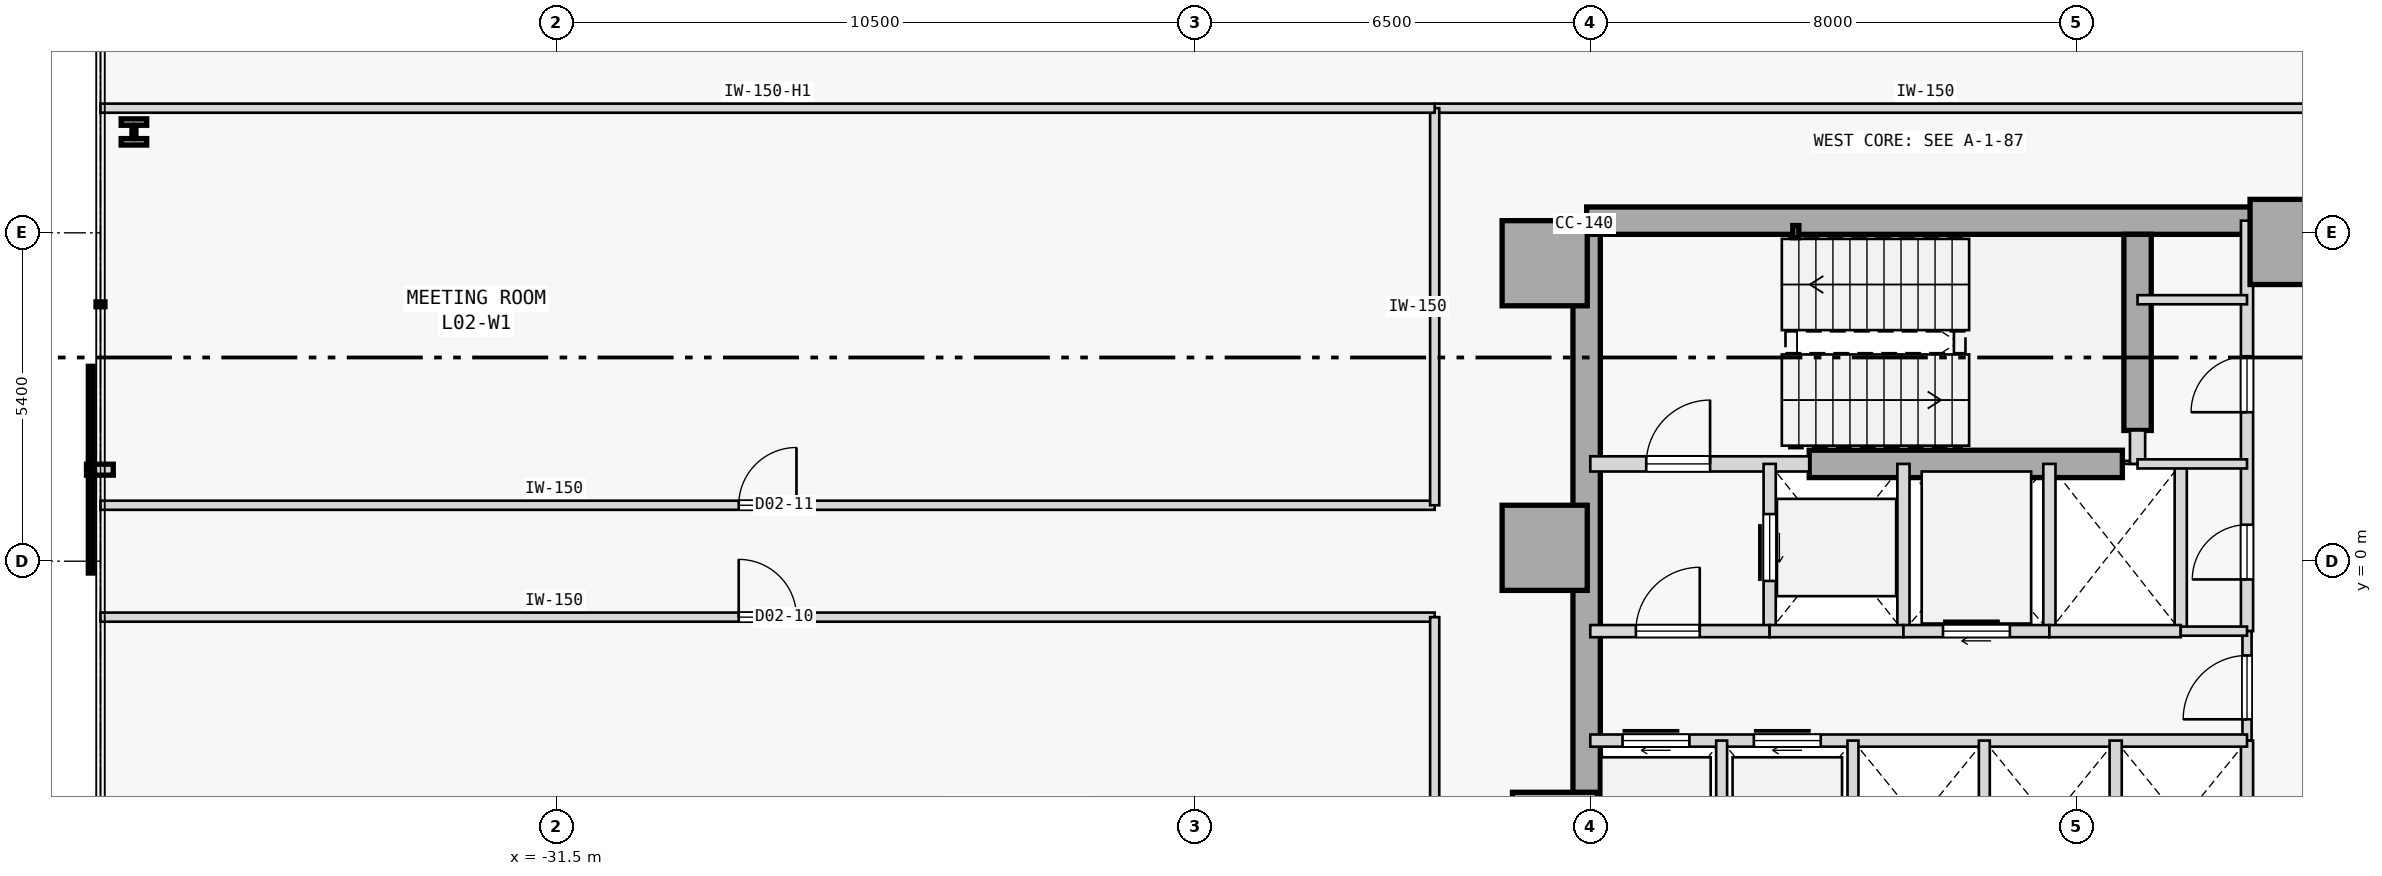
"""IFC4 building model, lengths in metres.
Left out: names, types, materials, properties, quantities, classifications, styles, units other than length and angle.
Written with IfcOpenShell. Run it as: python <this file> out.ifc"""

import sys

from ifc_helpers import new_model, si_unit, direction, frame, frame_2d, origin, origin_2d, place, context, subcontext, project, spatial, rectangle, hollow_rectangle, i_section, extrude, element, fill, save


model = new_model("IFC4")
c1 = context("Model", 3, precision=1e-05, world=origin(), true_north=direction((0.0, 1.0)))
c2 = subcontext(c1, "Body", "Model", "MODEL_VIEW")
j1 = project(units=[si_unit("LENGTHUNIT", "METRE"), si_unit("PLANEANGLEUNIT", "RADIAN")], contexts=[c1])
p1 = place(None, origin())
s1 = spatial("IfcSite", under=j1, at=p1, CompositionType="ELEMENT")
p2 = place(p1, origin())
s2 = spatial("IfcBuilding", under=s1, at=p2, CompositionType="ELEMENT")
p3 = place(p2, frame((0.0, 0.0, 14.2)))
s3 = spatial("IfcBuildingStorey", under=s2, at=p3, CompositionType="ELEMENT", Elevation=14.2)
for number, where, z_axis, x_axis in (
    (1, (-15.25, 4.9, 0.0), (0.0, 0.0, 1.0), (1.0, 0.0, 0.0)),
    (2, (-15.25, 0.22, 0.0), (0.0, 0.0, 1.0), (1.0, 0.0, 0.0)),
    (3, (-15.08, -4.5, 0.0), (0.0, 0.0, 1.0), (1.0, 0.0, 0.0)),
    (4, (-2.95, 5.25, 0.0), (0.0, 0.0, 1.0), (1.0, 0.0, 0.0)),
):
    element("IfcColumn", number, at=place(p3, frame(where, z_axis=z_axis, x_axis=x_axis)), inside=s3, PredefinedType="COLUMN", context=c2, shape_type="SweptSolid", body=[
        extrude(rectangle(XDim=1.4, YDim=1.4, at=origin_2d()), origin(), (0.0, 0.0, 1.0), 3.8),
    ])
p4 = place(p3, frame((-14.56, 5.6, 0.0), z_axis=(0.0, 0.0, 1.0), x_axis=(1.0, 0.0, 0.0)))
e5 = element("IfcWall", 5, at=p4, inside=s3, PredefinedType="SHEAR", context=c2, shape_type="SweptSolid", body=[
    extrude(rectangle(XDim=11.41, YDim=0.45, at=frame_2d((5.705, 0.0))), origin(), (0.0, 0.0, 1.0), 3.575),
])
p5 = place(p3, frame((-14.56, -5.375, 0.0), z_axis=(0.0, 0.0, 1.0), x_axis=(0.0, 1.0, 0.0)))
e6 = element("IfcWall", 6, at=p5, inside=s3, PredefinedType="SHEAR", context=c2, shape_type="SweptSolid", body=[
    extrude(rectangle(XDim=10.75, YDim=0.45, at=frame_2d((5.375, 0.0))), origin(), (0.0, 0.0, 1.0), 3.575),
])
p6 = place(p3, frame((-5.5, 2.15, 0.0), z_axis=(0.0, 0.0, 1.0), x_axis=(0.0, 1.0, 0.0)))
e7 = element("IfcWall", 7, at=p6, inside=s3, PredefinedType="SHEAR", context=c2, shape_type="SweptSolid", body=[
    extrude(rectangle(XDim=3.225, YDim=0.45, at=frame_2d((1.613, 0.0))), origin(), (0.0, 0.0, 1.0), 3.575),
])
p7 = place(p3, frame((-10.9, 1.6, 0.0), z_axis=(0.0, 0.0, 1.0), x_axis=(1.0, 0.0, 0.0)))
e8 = element("IfcWall", 8, at=p7, inside=s3, PredefinedType="SHEAR", context=c2, shape_type="SweptSolid", body=[
    extrude(rectangle(XDim=5.15, YDim=0.45, at=frame_2d((2.575, 0.0))), origin(), (0.0, 0.0, 1.0), 3.575),
])
p8 = place(p3, frame((-11.12, 5.42, 0.0), z_axis=(0.0, 0.0, 1.0), x_axis=(1.0, 0.0, 0.0)))
e9 = element("IfcColumn", 9, at=p8, inside=s3, PredefinedType="COLUMN", context=c2, shape_type="SweptSolid", body=[
    extrude(hollow_rectangle(XDim=0.1, YDim=0.2, WallThickness=0.008, at=origin_2d()), origin(), (0.0, 0.0, 1.0), 3.8),
])
p9 = place(p3, frame((-38.45, 7.059, 0.0), z_axis=(0.0, 0.0, 1.0), x_axis=(1.0, 0.0, 0.0)))
e10 = element("IfcColumn", 10, at=p9, inside=s3, PredefinedType="COLUMN", context=c2, shape_type="SweptSolid", body=[
    extrude(i_section(OverallWidth=0.42, OverallDepth=0.431, WebThickness=0.065, FlangeThickness=0.106, FilletRadius=0.015, at=origin_2d()), origin(), (0.0, 0.0, 1.0), 3.8),
])
p10 = place(p3, frame((-14.5, 1.6, 0.0), z_axis=(0.0, 0.0, 1.0), x_axis=(1.0, 0.0, 0.0)))
e11 = element("IfcWall", 11, at=p10, inside=s3, PredefinedType="STANDARD", context=c2, shape_type="SweptSolid", body=[
    extrude(rectangle(XDim=3.6, YDim=0.25, at=frame_2d((1.8, 0.0))), origin(), (0.0, 0.0, 1.0), 3.575),
])
p11 = place(p10, frame((0.92, 0.0, 0.0)))
e12 = element("IfcOpeningElement", 12, at=p11, cuts=e11, PredefinedType="OPENING", context=c2, shape_type="SweptSolid", body=[
    extrude(rectangle(XDim=1.05, YDim=2.15, at=frame_2d((0.525, 1.075))), frame((0.0, 0.135, 0.0), z_axis=(0.0, -1.0, 0.0), x_axis=(1.0, 0.0, 0.0)), (0.0, 0.0, 1.0), 0.27),
])
p12 = place(p3, frame((-5.5, 1.6, 0.0), z_axis=(0.0, 0.0, 1.0), x_axis=(0.0, 1.0, 0.0)))
e13 = element("IfcWall", 13, at=p12, inside=s3, PredefinedType="STANDARD", context=c2, shape_type="SweptSolid", body=[
    extrude(rectangle(XDim=0.55, YDim=0.25, at=frame_2d((0.275, 0.0))), origin(), (0.0, 0.0, 1.0), 3.575),
])
p13 = place(p3, frame((-3.7, -1.15, 0.0), z_axis=(0.0, 0.0, 1.0), x_axis=(0.0, 1.0, 0.0)))
e14 = element("IfcWall", 14, at=p13, inside=s3, PredefinedType="STANDARD", context=c2, shape_type="SweptSolid", body=[
    extrude(rectangle(XDim=6.75, YDim=0.2, at=frame_2d((3.375, 0.0))), origin(), (0.0, 0.0, 1.0), 3.575),
])
p14 = place(p13, frame((3.6, 0.0, 0.0)))
e15 = element("IfcOpeningElement", 15, at=p14, cuts=e14, PredefinedType="OPENING", context=c2, shape_type="SweptSolid", body=[
    extrude(rectangle(XDim=0.92, YDim=2.15, at=frame_2d((0.46, 1.075))), frame((0.0, 0.11, 0.0), z_axis=(0.0, -1.0, 0.0), x_axis=(1.0, 0.0, 0.0)), (0.0, 0.0, 1.0), 0.22),
])
p15 = place(p13, frame((0.85, 0.0, 0.0)))
e16 = element("IfcOpeningElement", 16, at=p15, cuts=e14, PredefinedType="OPENING", context=c2, shape_type="SweptSolid", body=[
    extrude(rectangle(XDim=0.9, YDim=2.15, at=frame_2d((0.45, 1.075))), frame((0.0, 0.11, 0.0), z_axis=(0.0, -1.0, 0.0), x_axis=(1.0, 0.0, 0.0)), (0.0, 0.0, 1.0), 0.22),
])
p16 = place(p3, frame((-3.7, -2.95, 0.0), z_axis=(0.0, 0.0, 1.0), x_axis=(0.0, 1.0, 0.0)))
e17 = element("IfcWall", 17, at=p16, inside=s3, PredefinedType="PARTITIONING", context=c2, shape_type="SweptSolid", body=[
    extrude(rectangle(XDim=1.8, YDim=0.15, at=frame_2d((0.9, 0.0))), origin(), (0.0, 0.0, 1.0), 3.575),
])
p17 = place(p16, frame((0.35, 0.0, 0.0)))
e18 = element("IfcOpeningElement", 18, at=p17, cuts=e17, PredefinedType="OPENING", context=c2, shape_type="SweptSolid", body=[
    extrude(rectangle(XDim=1.05, YDim=2.18, at=frame_2d((0.525, 1.09))), frame((0.0, 0.085, 0.0), z_axis=(0.0, -1.0, 0.0), x_axis=(1.0, 0.0, 0.0)), (0.0, 0.0, 1.0), 0.17),
])
p18 = place(p3, frame((-3.7, -5.6, 0.0), z_axis=(0.0, 0.0, 1.0), x_axis=(0.0, 1.0, 0.0)))
e19 = element("IfcWall", 19, at=p18, inside=s3, PredefinedType="STANDARD", context=c2, shape_type="SweptSolid", body=[
    extrude(rectangle(XDim=2.65, YDim=0.2, at=frame_2d((1.325, 0.0))), origin(), (0.0, 0.0, 1.0), 3.575),
])
p19 = place(p3, frame((-11.55, -1.15, 0.0), z_axis=(0.0, 0.0, 1.0), x_axis=(0.0, 1.0, 0.0)))
e20 = element("IfcWall", 20, at=p19, inside=s3, PredefinedType="STANDARD", context=c2, shape_type="SweptSolid", body=[
    extrude(rectangle(XDim=2.75, YDim=0.2, at=frame_2d((1.375, 0.0))), origin(), (0.0, 0.0, 1.0), 3.575),
])
p20 = place(p19, frame((0.825, 0.0, 0.0)))
e21 = element("IfcOpeningElement", 21, at=p20, cuts=e20, PredefinedType="OPENING", context=c2, shape_type="SweptSolid", body=[
    extrude(rectangle(XDim=1.1, YDim=2.15, at=frame_2d((0.55, 1.075))), frame((0.0, 0.11, 0.0), z_axis=(0.0, -1.0, 0.0), x_axis=(1.0, 0.0, 0.0)), (0.0, 0.0, 1.0), 0.22),
])
p21 = place(p3, frame((-9.35, -1.15, 0.0), z_axis=(0.0, 0.0, 1.0), x_axis=(0.0, 1.0, 0.0)))
e22 = element("IfcWall", 22, at=p21, inside=s3, PredefinedType="STANDARD", context=c2, shape_type="SweptSolid", body=[
    extrude(rectangle(XDim=2.75, YDim=0.2, at=frame_2d((1.375, 0.0))), origin(), (0.0, 0.0, 1.0), 3.575),
])
p22 = place(p3, frame((-14.5, -1.15, 0.0), z_axis=(0.0, 0.0, 1.0), x_axis=(1.0, 0.0, 0.0)))
e23 = element("IfcWall", 23, at=p22, inside=s3, PredefinedType="STANDARD", context=c2, shape_type="SweptSolid", body=[
    extrude(rectangle(XDim=2.95, YDim=0.2, at=frame_2d((1.475, 0.0))), origin(), (0.0, 0.0, 1.0), 3.575),
])
p23 = place(p22, frame((0.75, 0.0, 0.0)))
e24 = element("IfcOpeningElement", 24, at=p23, cuts=e23, PredefinedType="OPENING", context=c2, shape_type="SweptSolid", body=[
    extrude(rectangle(XDim=1.05, YDim=2.18, at=frame_2d((0.525, 1.09))), frame((0.0, 0.11, 0.0), z_axis=(0.0, -1.0, 0.0), x_axis=(1.0, 0.0, 0.0)), (0.0, 0.0, 1.0), 0.22),
])
p24 = place(p3, frame((-11.55, -1.15, 0.0), z_axis=(0.0, 0.0, 1.0), x_axis=(1.0, 0.0, 0.0)))
e25 = element("IfcWall", 25, at=p24, inside=s3, PredefinedType="STANDARD", context=c2, shape_type="SweptSolid", body=[
    extrude(rectangle(XDim=2.2, YDim=0.2, at=frame_2d((1.1, 0.0))), origin(), (0.0, 0.0, 1.0), 3.575),
])
p25 = place(p3, frame((-6.95, -1.15, 0.0), z_axis=(0.0, 0.0, 1.0), x_axis=(0.0, 1.0, 0.0)))
e26 = element("IfcWall", 26, at=p25, inside=s3, PredefinedType="STANDARD", context=c2, shape_type="SweptSolid", body=[
    extrude(rectangle(XDim=2.75, YDim=0.2, at=frame_2d((1.375, 0.0))), origin(), (0.0, 0.0, 1.0), 3.575),
])
p26 = place(p3, frame((-9.35, -1.15, 0.0), z_axis=(0.0, 0.0, 1.0), x_axis=(1.0, 0.0, 0.0)))
e27 = element("IfcWall", 27, at=p26, inside=s3, PredefinedType="STANDARD", context=c2, shape_type="SweptSolid", body=[
    extrude(rectangle(XDim=2.4, YDim=0.2, at=frame_2d((1.2, 0.0))), origin(), (0.0, 0.0, 1.0), 3.575),
])
p27 = place(p26, frame((0.65, 0.0, 0.0)))
e28 = element("IfcOpeningElement", 28, at=p27, cuts=e27, PredefinedType="OPENING", context=c2, shape_type="SweptSolid", body=[
    extrude(rectangle(XDim=1.1, YDim=2.15, at=frame_2d((0.55, 1.075))), frame((0.0, 0.11, 0.0), z_axis=(0.0, -1.0, 0.0), x_axis=(1.0, 0.0, 0.0)), (0.0, 0.0, 1.0), 0.22),
])
p28 = place(p3, frame((-4.79, -1.15, 0.0), z_axis=(0.0, 0.0, 1.0), x_axis=(0.0, 1.0, 0.0)))
e29 = element("IfcWall", 29, at=p28, inside=s3, PredefinedType="STANDARD", context=c2, shape_type="SweptSolid", body=[
    extrude(rectangle(XDim=2.75, YDim=0.2, at=frame_2d((1.375, 0.0))), origin(), (0.0, 0.0, 1.0), 3.575),
])
p29 = place(p3, frame((-6.95, -1.15, 0.0), z_axis=(0.0, 0.0, 1.0), x_axis=(1.0, 0.0, 0.0)))
e30 = element("IfcWall", 30, at=p29, inside=s3, PredefinedType="STANDARD", context=c2, shape_type="SweptSolid", body=[
    extrude(rectangle(XDim=2.16, YDim=0.2, at=frame_2d((1.08, 0.0))), origin(), (0.0, 0.0, 1.0), 3.575),
])
p30 = place(p3, frame((-4.79, -1.15, 0.0), z_axis=(0.0, 0.0, 1.0), x_axis=(1.0, 0.0, 0.0)))
e31 = element("IfcWall", 31, at=p30, inside=s3, PredefinedType="PARTITIONING", context=c2, shape_type="SweptSolid", body=[
    extrude(rectangle(XDim=1.09, YDim=0.15, at=frame_2d((0.545, 0.0))), origin(), (0.0, 0.0, 1.0), 3.575),
])
p31 = place(p3, frame((-14.5, -2.95, 0.0), z_axis=(0.0, 0.0, 1.0), x_axis=(1.0, 0.0, 0.0)))
e32 = element("IfcWall", 32, at=p31, inside=s3, PredefinedType="STANDARD", context=c2, shape_type="SweptSolid", body=[
    extrude(rectangle(XDim=10.8, YDim=0.2, at=frame_2d((5.4, 0.0))), origin(), (0.0, 0.0, 1.0), 3.575),
])
p32 = place(p31, frame((0.53, 0.0, 0.0)))
e33 = element("IfcOpeningElement", 33, at=p32, cuts=e32, PredefinedType="OPENING", context=c2, shape_type="SweptSolid", body=[
    extrude(rectangle(XDim=1.1, YDim=2.15, at=frame_2d((0.55, 1.075))), frame((0.0, 0.11, 0.0), z_axis=(0.0, -1.0, 0.0), x_axis=(1.0, 0.0, 0.0)), (0.0, 0.0, 1.0), 0.22),
])
p33 = place(p31, frame((2.69, 0.0, 0.0)))
e34 = element("IfcOpeningElement", 34, at=p33, cuts=e32, PredefinedType="OPENING", context=c2, shape_type="SweptSolid", body=[
    extrude(rectangle(XDim=1.1, YDim=2.15, at=frame_2d((0.55, 1.075))), frame((0.0, 0.11, 0.0), z_axis=(0.0, -1.0, 0.0), x_axis=(1.0, 0.0, 0.0)), (0.0, 0.0, 1.0), 0.22),
])
p34 = place(p3, frame((-5.86, -5.6, 0.0), z_axis=(0.0, 0.0, 1.0), x_axis=(0.0, 1.0, 0.0)))
e35 = element("IfcWall", 35, at=p34, inside=s3, PredefinedType="STANDARD", context=c2, shape_type="SweptSolid", body=[
    extrude(rectangle(XDim=2.65, YDim=0.2, at=frame_2d((1.325, 0.0))), origin(), (0.0, 0.0, 1.0), 3.575),
])
for number, where, z_axis, x_axis in (
    (36, (-12.34, -5.6, 0.0), (0.0, 0.0, 1.0), (0.0, 1.0, 0.0)),
    (37, (-10.18, -5.6, 0.0), (0.0, 0.0, 1.0), (0.0, 1.0, 0.0)),
    (38, (-8.02, -5.6, 0.0), (0.0, 0.0, 1.0), (0.0, 1.0, 0.0)),
):
    element("IfcWall", number, at=place(p3, frame(where, z_axis=z_axis, x_axis=x_axis)), inside=s3, PredefinedType="STANDARD", context=c2, shape_type="SweptSolid", body=[
        extrude(rectangle(XDim=2.65, YDim=0.18, at=frame_2d((1.325, 0.0))), origin(), (0.0, 0.0, 1.0), 3.575),
    ])
for number, where, z_axis, x_axis in (
    (39, (-5.5, 4.3, 0.0), (0.0, 0.0, 1.0), (1.0, 0.0, 0.0)),
    (40, (-5.5, 1.6, 0.0), (0.0, 0.0, 1.0), (1.0, 0.0, 0.0)),
):
    element("IfcWall", number, at=place(p3, frame(where, z_axis=z_axis, x_axis=x_axis)), inside=s3, PredefinedType="PARTITIONING", context=c2, shape_type="SweptSolid", body=[
        extrude(rectangle(XDim=1.8, YDim=0.15, at=frame_2d((0.9, 0.0))), origin(), (0.0, 0.0, 1.0), 3.575),
    ])
p35 = place(p3, frame((-17.059, 7.45, 0.0), z_axis=(0.0, 0.0, 1.0), x_axis=(1.0, 0.0, 0.0)))
e41 = element("IfcWall", 41, at=p35, inside=s3, PredefinedType="PARTITIONING", context=c2, shape_type="SweptSolid", body=[
    extrude(rectangle(XDim=16.139, YDim=0.15, at=frame_2d((8.07, 0.0))), origin(), (0.0, 0.0, 1.0), 3.575),
])
p36 = place(p3, frame((-39.0, -0.92, 0.0), z_axis=(0.0, 0.0, 1.0), x_axis=(1.0, 0.0, 0.0)))
e42 = element("IfcWall", 42, at=p36, inside=s3, PredefinedType="PARTITIONING", context=c2, shape_type="SweptSolid", body=[
    extrude(rectangle(XDim=21.941, YDim=0.15, at=frame_2d((10.97, 0.0))), origin(), (0.0, 0.0, 1.0), 3.575),
])
p37 = place(p36, frame((10.496, 0.0, 0.0)))
e43 = element("IfcOpeningElement", 43, at=p37, cuts=e42, PredefinedType="OPENING", context=c2, shape_type="SweptSolid", body=[
    extrude(rectangle(XDim=0.95, YDim=2.15, at=frame_2d((0.475, 1.075))), frame((0.0, 0.085, 0.0), z_axis=(0.0, -1.0, 0.0), x_axis=(1.0, 0.0, 0.0)), (0.0, 0.0, 1.0), 0.17),
])
p38 = place(p3, frame((-17.059, -7.45, 0.0), z_axis=(0.0, 0.0, 1.0), x_axis=(0.0, 1.0, 0.0)))
e44 = element("IfcWall", 44, at=p38, inside=s3, PredefinedType="PARTITIONING", context=c2, shape_type="SweptSolid", body=[
    extrude(rectangle(XDim=6.53, YDim=0.15, at=frame_2d((3.265, 0.0))), origin(), (0.0, 0.0, 1.0), 3.575),
])
p39 = place(p3, frame((-39.0, 0.92, 0.0), z_axis=(0.0, 0.0, 1.0), x_axis=(1.0, 0.0, 0.0)))
e45 = element("IfcWall", 45, at=p39, inside=s3, PredefinedType="PARTITIONING", context=c2, shape_type="SweptSolid", body=[
    extrude(rectangle(XDim=21.941, YDim=0.15, at=frame_2d((10.97, 0.0))), origin(), (0.0, 0.0, 1.0), 3.575),
])
p40 = place(p39, frame((10.496, 0.0, 0.0)))
e46 = element("IfcOpeningElement", 46, at=p40, cuts=e45, PredefinedType="OPENING", context=c2, shape_type="SweptSolid", body=[
    extrude(rectangle(XDim=0.95, YDim=2.15, at=frame_2d((0.475, 1.075))), frame((0.0, 0.085, 0.0), z_axis=(0.0, -1.0, 0.0), x_axis=(1.0, 0.0, 0.0)), (0.0, 0.0, 1.0), 0.17),
])
p41 = place(p3, frame((-17.059, 0.92, 0.0), z_axis=(0.0, 0.0, 1.0), x_axis=(0.0, 1.0, 0.0)))
e47 = element("IfcWall", 47, at=p41, inside=s3, PredefinedType="PARTITIONING", context=c2, shape_type="SweptSolid", body=[
    extrude(rectangle(XDim=6.53, YDim=0.15, at=frame_2d((3.265, 0.0))), origin(), (0.0, 0.0, 1.0), 3.575),
])
p42 = place(p3, frame((-39.0, 7.45, 0.0), z_axis=(0.0, 0.0, 1.0), x_axis=(1.0, 0.0, 0.0)))
e48 = element("IfcWall", 48, at=p42, inside=s3, PredefinedType="PARTITIONING", context=c2, shape_type="SweptSolid", body=[
    extrude(rectangle(XDim=21.941, YDim=0.15, at=frame_2d((10.97, 0.0))), origin(), (0.0, 0.0, 1.0), 3.125),
])
p43 = place(p11, origin())
e49 = element("IfcDoor", 49, at=p43, inside=s3, OperationType="SINGLE_SWING_RIGHT", PredefinedType="DOOR", context=c2, shape_type="SweptSolid", body=[
    extrude(rectangle(XDim=1.05, YDim=2.15, at=frame_2d((0.525, 1.075))), frame((0.0, 0.025, 0.0), z_axis=(0.0, -1.0, 0.0), x_axis=(1.0, 0.0, 0.0)), (0.0, 0.0, 1.0), 0.05),
])
fill(e12, e49)
p44 = place(p23, origin())
e50 = element("IfcDoor", 50, at=p44, inside=s3, OperationType="SINGLE_SWING_RIGHT", PredefinedType="DOOR", context=c2, shape_type="SweptSolid", body=[
    extrude(rectangle(XDim=1.05, YDim=2.18, at=frame_2d((0.525, 1.09))), frame((0.0, 0.025, 0.0), z_axis=(0.0, -1.0, 0.0), x_axis=(1.0, 0.0, 0.0)), (0.0, 0.0, 1.0), 0.05),
])
fill(e24, e50)
p45 = place(p17, origin())
e51 = element("IfcDoor", 51, at=p45, inside=s3, OperationType="SINGLE_SWING_LEFT", PredefinedType="DOOR", context=c2, shape_type="SweptSolid", body=[
    extrude(rectangle(XDim=1.05, YDim=2.18, at=frame_2d((0.525, 1.09))), frame((0.0, 0.025, 0.0), z_axis=(0.0, -1.0, 0.0), x_axis=(1.0, 0.0, 0.0)), (0.0, 0.0, 1.0), 0.05),
])
fill(e18, e51)
p46 = place(p20, origin())
e52 = element("IfcDoor", 52, at=p46, inside=s3, OperationType="SLIDING_TO_RIGHT", PredefinedType="DOOR", context=c2, shape_type="SweptSolid", body=[
    extrude(rectangle(XDim=1.1, YDim=2.15, at=frame_2d((0.55, 1.075))), frame((0.0, 0.025, 0.0), z_axis=(0.0, -1.0, 0.0), x_axis=(1.0, 0.0, 0.0)), (0.0, 0.0, 1.0), 0.05),
])
fill(e21, e52)
p47 = place(p27, origin())
e53 = element("IfcDoor", 53, at=p47, inside=s3, OperationType="SLIDING_TO_RIGHT", PredefinedType="DOOR", context=c2, shape_type="SweptSolid", body=[
    extrude(rectangle(XDim=1.1, YDim=2.15, at=frame_2d((0.55, 1.075))), frame((0.0, 0.025, 0.0), z_axis=(0.0, -1.0, 0.0), x_axis=(1.0, 0.0, 0.0)), (0.0, 0.0, 1.0), 0.05),
])
fill(e28, e53)
p48 = place(p32, origin())
e54 = element("IfcDoor", 54, at=p48, inside=s3, OperationType="SLIDING_TO_RIGHT", PredefinedType="DOOR", context=c2, shape_type="SweptSolid", body=[
    extrude(rectangle(XDim=1.1, YDim=2.15, at=frame_2d((0.55, 1.075))), frame((0.0, 0.025, 0.0), z_axis=(0.0, -1.0, 0.0), x_axis=(1.0, 0.0, 0.0)), (0.0, 0.0, 1.0), 0.05),
])
fill(e33, e54)
p49 = place(p33, origin())
e55 = element("IfcDoor", 55, at=p49, inside=s3, OperationType="SLIDING_TO_RIGHT", PredefinedType="DOOR", context=c2, shape_type="SweptSolid", body=[
    extrude(rectangle(XDim=1.1, YDim=2.15, at=frame_2d((0.55, 1.075))), frame((0.0, 0.025, 0.0), z_axis=(0.0, -1.0, 0.0), x_axis=(1.0, 0.0, 0.0)), (0.0, 0.0, 1.0), 0.05),
])
fill(e34, e55)
p50 = place(p14, origin())
e56 = element("IfcDoor", 56, at=p50, inside=s3, OperationType="SINGLE_SWING_LEFT", PredefinedType="DOOR", context=c2, shape_type="SweptSolid", body=[
    extrude(rectangle(XDim=0.92, YDim=2.15, at=frame_2d((0.46, 1.075))), frame((0.0, 0.025, 0.0), z_axis=(0.0, -1.0, 0.0), x_axis=(1.0, 0.0, 0.0)), (0.0, 0.0, 1.0), 0.05),
])
fill(e15, e56)
p51 = place(p15, origin())
e57 = element("IfcDoor", 57, at=p51, inside=s3, OperationType="SINGLE_SWING_LEFT", PredefinedType="DOOR", context=c2, shape_type="SweptSolid", body=[
    extrude(rectangle(XDim=0.9, YDim=2.15, at=frame_2d((0.45, 1.075))), frame((0.0, 0.025, 0.0), z_axis=(0.0, -1.0, 0.0), x_axis=(1.0, 0.0, 0.0)), (0.0, 0.0, 1.0), 0.05),
])
fill(e16, e57)
p52 = place(p37, origin())
e58 = element("IfcDoor", 58, at=p52, inside=s3, OperationType="SINGLE_SWING_LEFT", PredefinedType="DOOR", context=c2, shape_type="SweptSolid", body=[
    extrude(rectangle(XDim=0.95, YDim=2.15, at=frame_2d((0.475, 1.075))), frame((0.0, 0.025, 0.0), z_axis=(0.0, -1.0, 0.0), x_axis=(1.0, 0.0, 0.0)), (0.0, 0.0, 1.0), 0.05),
])
fill(e43, e58)
p53 = place(p40, origin())
e59 = element("IfcDoor", 59, at=p53, inside=s3, OperationType="SINGLE_SWING_RIGHT", PredefinedType="DOOR", context=c2, shape_type="SweptSolid", body=[
    extrude(rectangle(XDim=0.95, YDim=2.15, at=frame_2d((0.475, 1.075))), frame((0.0, 0.025, 0.0), z_axis=(0.0, -1.0, 0.0), x_axis=(1.0, 0.0, 0.0)), (0.0, 0.0, 1.0), 0.05),
])
fill(e46, e59)
save(model, sys.argv[1])
